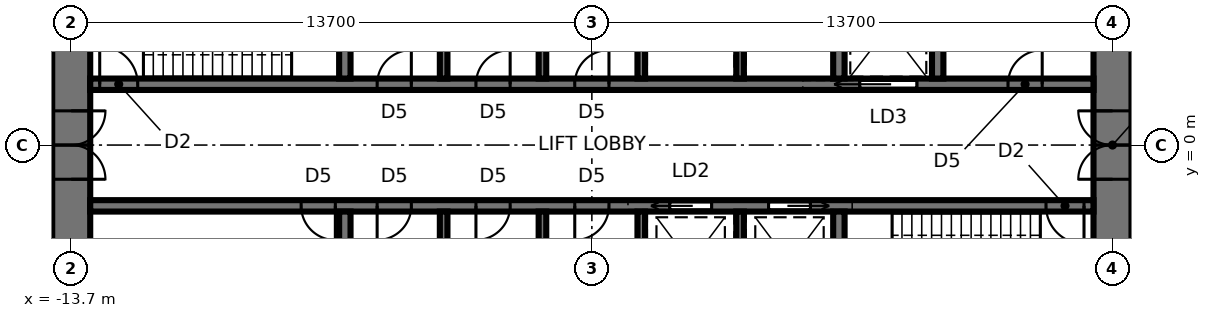
"""IFC4 building model, lengths in metres.
Left out: names, types, materials, properties, quantities, classifications, styles, units other than length and angle.
Written with IfcOpenShell. Run it as: python <this file> out.ifc"""

import sys

from ifc_helpers import new_model, si_unit, direction, frame, frame_2d, origin, place, context, subcontext, project, spatial, rectangle, extrude, element, fill, save


model = new_model("IFC4")
c1 = context("Model", 3, precision=1e-05, world=origin(), true_north=direction((0.0, 1.0)))
c2 = subcontext(c1, "Body", "Model", "MODEL_VIEW")
j1 = project(units=[si_unit("LENGTHUNIT", "METRE"), si_unit("PLANEANGLEUNIT", "RADIAN")], contexts=[c1])
p1 = place(None, origin())
s1 = spatial("IfcSite", under=j1, at=p1, CompositionType="ELEMENT")
p2 = place(p1, origin())
s2 = spatial("IfcBuilding", under=s1, at=p2, CompositionType="ELEMENT")
p3 = place(p2, frame((0.0, 0.0, 246.2)))
s3 = spatial("IfcBuildingStorey", under=s2, at=p3, CompositionType="ELEMENT", Elevation=246.2)
p4 = place(p3, frame((13.7, -9.5, 0.0), z_axis=(0.0, 0.0, 1.0), x_axis=(0.0, 1.0, 0.0)))
e1 = element("IfcWall", 1, at=p4, inside=s3, PredefinedType="SHEAR", context=c2, shape_type="SweptSolid", body=[
    extrude(rectangle(XDim=19.0, YDim=1.0, at=frame_2d((9.5, 0.0))), origin(), (0.0, 0.0, 1.0), 5.6),
])
p5 = place(p4, frame((8.6, 0.0, 0.0)))
e2 = element("IfcOpeningElement", 2, at=p5, cuts=e1, PredefinedType="OPENING", context=c2, shape_type="SweptSolid", body=[
    extrude(rectangle(XDim=1.8, YDim=2.4, at=frame_2d((0.9, 1.2))), frame((0.0, 0.51, 0.0), z_axis=(0.0, -1.0, 0.0), x_axis=(1.0, 0.0, 0.0)), (0.0, 0.0, 1.0), 1.02),
])
p6 = place(p3, frame((-13.7, 9.5, 0.0), z_axis=(0.0, 0.0, 1.0), x_axis=(0.0, -1.0, 0.0)))
e3 = element("IfcWall", 3, at=p6, inside=s3, PredefinedType="SHEAR", context=c2, shape_type="SweptSolid", body=[
    extrude(rectangle(XDim=19.0, YDim=1.0, at=frame_2d((9.5, 0.0))), origin(), (0.0, 0.0, 1.0), 5.6),
])
p7 = place(p6, frame((8.6, 0.0, 0.0)))
e4 = element("IfcOpeningElement", 4, at=p7, cuts=e3, PredefinedType="OPENING", context=c2, shape_type="SweptSolid", body=[
    extrude(rectangle(XDim=1.8, YDim=2.4, at=frame_2d((0.9, 1.2))), frame((0.0, 0.51, 0.0), z_axis=(0.0, -1.0, 0.0), x_axis=(1.0, 0.0, 0.0)), (0.0, 0.0, 1.0), 1.02),
])
p8 = place(p3, frame((-13.2, 1.6, 0.0), z_axis=(0.0, 0.0, 1.0), x_axis=(1.0, 0.0, 0.0)))
e5 = element("IfcWall", 5, at=p8, inside=s3, PredefinedType="SHEAR", context=c2, shape_type="SweptSolid", body=[
    extrude(rectangle(XDim=26.4, YDim=0.3, at=frame_2d((13.2, 0.0))), origin(), (0.0, 0.0, 1.0), 5.6),
])
p9 = place(p8, frame((0.25, 0.0, 0.0)))
e6 = element("IfcOpeningElement", 6, at=p9, cuts=e5, PredefinedType="OPENING", context=c2, shape_type="SweptSolid", body=[
    extrude(rectangle(XDim=1.0, YDim=2.1, at=frame_2d((0.5, 1.05))), frame((0.0, 0.16, 0.0), z_axis=(0.0, -1.0, 0.0), x_axis=(1.0, 0.0, 0.0)), (0.0, 0.0, 1.0), 0.32),
])
p10 = place(p8, frame((20.25, 0.0, 0.0)))
e7 = element("IfcOpeningElement", 7, at=p10, cuts=e5, PredefinedType="OPENING", context=c2, shape_type="SweptSolid", body=[
    extrude(rectangle(XDim=1.5, YDim=2.4, at=frame_2d((0.75, 1.2))), frame((0.0, 0.16, 0.0), z_axis=(0.0, -1.0, 0.0), x_axis=(1.0, 0.0, 0.0)), (0.0, 0.0, 1.0), 0.32),
])
p11 = place(p8, frame((7.55, 0.0, 0.0)))
e8 = element("IfcOpeningElement", 8, at=p11, cuts=e5, PredefinedType="OPENING", context=c2, shape_type="SweptSolid", body=[
    extrude(rectangle(XDim=0.9, YDim=2.1, at=frame_2d((0.45, 1.05))), frame((0.0, 0.16, 0.0), z_axis=(0.0, -1.0, 0.0), x_axis=(1.0, 0.0, 0.0)), (0.0, 0.0, 1.0), 0.32),
])
p12 = place(p8, frame((10.15, 0.0, 0.0)))
e9 = element("IfcOpeningElement", 9, at=p12, cuts=e5, PredefinedType="OPENING", context=c2, shape_type="SweptSolid", body=[
    extrude(rectangle(XDim=0.9, YDim=2.1, at=frame_2d((0.45, 1.05))), frame((0.0, 0.16, 0.0), z_axis=(0.0, -1.0, 0.0), x_axis=(1.0, 0.0, 0.0)), (0.0, 0.0, 1.0), 0.32),
])
p13 = place(p8, frame((12.75, 0.0, 0.0)))
e10 = element("IfcOpeningElement", 10, at=p13, cuts=e5, PredefinedType="OPENING", context=c2, shape_type="SweptSolid", body=[
    extrude(rectangle(XDim=0.9, YDim=2.1, at=frame_2d((0.45, 1.05))), frame((0.0, 0.16, 0.0), z_axis=(0.0, -1.0, 0.0), x_axis=(1.0, 0.0, 0.0)), (0.0, 0.0, 1.0), 0.32),
])
p14 = place(p8, frame((24.15, 0.0, 0.0)))
e11 = element("IfcOpeningElement", 11, at=p14, cuts=e5, PredefinedType="OPENING", context=c2, shape_type="SweptSolid", body=[
    extrude(rectangle(XDim=0.9, YDim=2.1, at=frame_2d((0.45, 1.05))), frame((0.0, 0.16, 0.0), z_axis=(0.0, -1.0, 0.0), x_axis=(1.0, 0.0, 0.0)), (0.0, 0.0, 1.0), 0.32),
])
p15 = place(p3, frame((-13.2, -1.6, 0.0), z_axis=(0.0, 0.0, 1.0), x_axis=(1.0, 0.0, 0.0)))
e12 = element("IfcWall", 12, at=p15, inside=s3, PredefinedType="SHEAR", context=c2, shape_type="SweptSolid", body=[
    extrude(rectangle(XDim=26.4, YDim=0.3, at=frame_2d((13.2, 0.0))), origin(), (0.0, 0.0, 1.0), 5.6),
])
p16 = place(p15, frame((25.15, 0.0, 0.0)))
e13 = element("IfcOpeningElement", 13, at=p16, cuts=e12, PredefinedType="OPENING", context=c2, shape_type="SweptSolid", body=[
    extrude(rectangle(XDim=1.0, YDim=2.1, at=frame_2d((0.5, 1.05))), frame((0.0, 0.16, 0.0), z_axis=(0.0, -1.0, 0.0), x_axis=(1.0, 0.0, 0.0)), (0.0, 0.0, 1.0), 0.32),
])
p17 = place(p15, frame((7.55, 0.0, 0.0)))
e14 = element("IfcOpeningElement", 14, at=p17, cuts=e12, PredefinedType="OPENING", context=c2, shape_type="SweptSolid", body=[
    extrude(rectangle(XDim=0.9, YDim=2.1, at=frame_2d((0.45, 1.05))), frame((0.0, 0.16, 0.0), z_axis=(0.0, -1.0, 0.0), x_axis=(1.0, 0.0, 0.0)), (0.0, 0.0, 1.0), 0.32),
])
p18 = place(p15, frame((10.15, 0.0, 0.0)))
e15 = element("IfcOpeningElement", 15, at=p18, cuts=e12, PredefinedType="OPENING", context=c2, shape_type="SweptSolid", body=[
    extrude(rectangle(XDim=0.9, YDim=2.1, at=frame_2d((0.45, 1.05))), frame((0.0, 0.16, 0.0), z_axis=(0.0, -1.0, 0.0), x_axis=(1.0, 0.0, 0.0)), (0.0, 0.0, 1.0), 0.32),
])
p19 = place(p15, frame((12.75, 0.0, 0.0)))
e16 = element("IfcOpeningElement", 16, at=p19, cuts=e12, PredefinedType="OPENING", context=c2, shape_type="SweptSolid", body=[
    extrude(rectangle(XDim=0.9, YDim=2.1, at=frame_2d((0.45, 1.05))), frame((0.0, 0.16, 0.0), z_axis=(0.0, -1.0, 0.0), x_axis=(1.0, 0.0, 0.0)), (0.0, 0.0, 1.0), 0.32),
])
p20 = place(p15, frame((15.25, 0.0, 0.0)))
e17 = element("IfcOpeningElement", 17, at=p20, cuts=e12, PredefinedType="OPENING", context=c2, shape_type="SweptSolid", body=[
    extrude(rectangle(XDim=1.1, YDim=2.3, at=frame_2d((0.55, 1.15))), frame((0.0, 0.16, 0.0), z_axis=(0.0, -1.0, 0.0), x_axis=(1.0, 0.0, 0.0)), (0.0, 0.0, 1.0), 0.32),
])
p21 = place(p15, frame((17.85, 0.0, 0.0)))
e18 = element("IfcOpeningElement", 18, at=p21, cuts=e12, PredefinedType="OPENING", context=c2, shape_type="SweptSolid", body=[
    extrude(rectangle(XDim=1.1, YDim=2.3, at=frame_2d((0.55, 1.15))), frame((0.0, 0.16, 0.0), z_axis=(0.0, -1.0, 0.0), x_axis=(1.0, 0.0, 0.0)), (0.0, 0.0, 1.0), 0.32),
])
p22 = place(p15, frame((5.55, 0.0, 0.0)))
e19 = element("IfcOpeningElement", 19, at=p22, cuts=e12, PredefinedType="OPENING", context=c2, shape_type="SweptSolid", body=[
    extrude(rectangle(XDim=0.9, YDim=2.1, at=frame_2d((0.45, 1.05))), frame((0.0, 0.16, 0.0), z_axis=(0.0, -1.0, 0.0), x_axis=(1.0, 0.0, 0.0)), (0.0, 0.0, 1.0), 0.32),
])
for number, where, z_axis, x_axis in (
    (20, (-6.5, 1.75, 0.0), (0.0, 0.0, 1.0), (0.0, 1.0, 0.0)),
    (21, (6.5, 1.75, 0.0), (0.0, 0.0, 1.0), (0.0, 1.0, 0.0)),
):
    element("IfcWall", number, at=place(p3, frame(where, z_axis=z_axis, x_axis=x_axis)), inside=s3, PredefinedType="SHEAR", context=c2, shape_type="SweptSolid", body=[
        extrude(rectangle(XDim=2.7, YDim=0.3, at=frame_2d((1.35, 0.0))), origin(), (0.0, 0.0, 1.0), 5.6),
    ])
for number, where, z_axis, x_axis in (
    (22, (-3.9, 1.75, 0.0), (0.0, 0.0, 1.0), (0.0, 1.0, 0.0)),
    (23, (-1.3, 1.75, 0.0), (0.0, 0.0, 1.0), (0.0, 1.0, 0.0)),
    (24, (1.3, 1.75, 0.0), (0.0, 0.0, 1.0), (0.0, 1.0, 0.0)),
    (25, (3.9, 1.75, 0.0), (0.0, 0.0, 1.0), (0.0, 1.0, 0.0)),
):
    element("IfcWall", number, at=place(p3, frame(where, z_axis=z_axis, x_axis=x_axis)), inside=s3, PredefinedType="SHEAR", context=c2, shape_type="SweptSolid", body=[
        extrude(rectangle(XDim=2.7, YDim=0.2, at=frame_2d((1.35, 0.0))), origin(), (0.0, 0.0, 1.0), 5.6),
    ])
for number, where, z_axis, x_axis in (
    (26, (-6.5, -1.75, 0.0), (0.0, 0.0, 1.0), (0.0, -1.0, 0.0)),
    (27, (6.5, -1.75, 0.0), (0.0, 0.0, 1.0), (0.0, -1.0, 0.0)),
):
    element("IfcWall", number, at=place(p3, frame(where, z_axis=z_axis, x_axis=x_axis)), inside=s3, PredefinedType="SHEAR", context=c2, shape_type="SweptSolid", body=[
        extrude(rectangle(XDim=2.7, YDim=0.3, at=frame_2d((1.35, 0.0))), origin(), (0.0, 0.0, 1.0), 5.6),
    ])
for number, where, z_axis, x_axis in (
    (28, (-3.9, -1.75, 0.0), (0.0, 0.0, 1.0), (0.0, -1.0, 0.0)),
    (29, (-1.3, -1.75, 0.0), (0.0, 0.0, 1.0), (0.0, -1.0, 0.0)),
    (30, (1.3, -1.75, 0.0), (0.0, 0.0, 1.0), (0.0, -1.0, 0.0)),
    (31, (3.9, -1.75, 0.0), (0.0, 0.0, 1.0), (0.0, -1.0, 0.0)),
):
    element("IfcWall", number, at=place(p3, frame(where, z_axis=z_axis, x_axis=x_axis)), inside=s3, PredefinedType="SHEAR", context=c2, shape_type="SweptSolid", body=[
        extrude(rectangle(XDim=2.7, YDim=0.2, at=frame_2d((1.35, 0.0))), origin(), (0.0, 0.0, 1.0), 5.6),
    ])
p23 = place(p3, frame((9.1, 1.75, 0.0), z_axis=(0.0, 0.0, 1.0), x_axis=(0.0, 1.0, 0.0)))
e32 = element("IfcWall", 32, at=p23, inside=s3, PredefinedType="SHEAR", context=c2, shape_type="SweptSolid", body=[
    extrude(rectangle(XDim=2.7, YDim=0.3, at=frame_2d((1.35, 0.0))), origin(), (0.0, 0.0, 1.0), 5.6),
])
p24 = place(p7, origin())
e33 = element("IfcDoor", 33, at=p24, inside=s3, OperationType="DOUBLE_DOOR_SINGLE_SWING", PredefinedType="DOOR", context=c2, shape_type="SweptSolid", body=[
    extrude(rectangle(XDim=1.72, YDim=2.36, at=frame_2d((0.9, 1.18))), frame((0.0, 0.025, 0.0), z_axis=(0.0, -1.0, 0.0), x_axis=(1.0, 0.0, 0.0)), (0.0, 0.0, 1.0), 0.05),
    extrude(rectangle(XDim=0.04, YDim=2.4, at=frame_2d((0.02, 1.2))), frame((0.0, 0.25, 0.0), z_axis=(0.0, -1.0, 0.0), x_axis=(1.0, 0.0, 0.0)), (0.0, 0.0, 1.0), 0.5),
    extrude(rectangle(XDim=0.04, YDim=2.4, at=frame_2d((1.78, 1.2))), frame((0.0, 0.25, 0.0), z_axis=(0.0, -1.0, 0.0), x_axis=(1.0, 0.0, 0.0)), (0.0, 0.0, 1.0), 0.5),
    extrude(rectangle(XDim=1.72, YDim=0.04, at=frame_2d((0.9, 2.38))), frame((0.0, 0.25, 0.0), z_axis=(0.0, -1.0, 0.0), x_axis=(1.0, 0.0, 0.0)), (0.0, 0.0, 1.0), 0.5),
])
fill(e4, e33)
p25 = place(p5, origin())
e34 = element("IfcDoor", 34, at=p25, inside=s3, OperationType="DOUBLE_DOOR_SINGLE_SWING", PredefinedType="DOOR", context=c2, shape_type="SweptSolid", body=[
    extrude(rectangle(XDim=1.72, YDim=2.36, at=frame_2d((0.9, 1.18))), frame((0.0, 0.025, 0.0), z_axis=(0.0, -1.0, 0.0), x_axis=(1.0, 0.0, 0.0)), (0.0, 0.0, 1.0), 0.05),
    extrude(rectangle(XDim=0.04, YDim=2.4, at=frame_2d((0.02, 1.2))), frame((0.0, 0.25, 0.0), z_axis=(0.0, -1.0, 0.0), x_axis=(1.0, 0.0, 0.0)), (0.0, 0.0, 1.0), 0.5),
    extrude(rectangle(XDim=0.04, YDim=2.4, at=frame_2d((1.78, 1.2))), frame((0.0, 0.25, 0.0), z_axis=(0.0, -1.0, 0.0), x_axis=(1.0, 0.0, 0.0)), (0.0, 0.0, 1.0), 0.5),
    extrude(rectangle(XDim=1.72, YDim=0.04, at=frame_2d((0.9, 2.38))), frame((0.0, 0.25, 0.0), z_axis=(0.0, -1.0, 0.0), x_axis=(1.0, 0.0, 0.0)), (0.0, 0.0, 1.0), 0.5),
])
fill(e2, e34)
p26 = place(p9, origin())
e35 = element("IfcDoor", 35, at=p26, inside=s3, OperationType="SINGLE_SWING_LEFT", PredefinedType="DOOR", context=c2, shape_type="SweptSolid", body=[
    extrude(rectangle(XDim=1.0, YDim=2.1, at=frame_2d((0.5, 1.05))), frame((0.0, 0.025, 0.0), z_axis=(0.0, -1.0, 0.0), x_axis=(1.0, 0.0, 0.0)), (0.0, 0.0, 1.0), 0.05),
])
fill(e6, e35)
p27 = place(p16, frame((1.0, 0.0, 0.0), z_axis=(0.0, 0.0, 1.0), x_axis=(-1.0, 0.0, 0.0)))
e36 = element("IfcDoor", 36, at=p27, inside=s3, OperationType="SINGLE_SWING_LEFT", PredefinedType="DOOR", context=c2, shape_type="SweptSolid", body=[
    extrude(rectangle(XDim=1.0, YDim=2.1, at=frame_2d((0.5, 1.05))), frame((0.0, 0.025, 0.0), z_axis=(0.0, -1.0, 0.0), x_axis=(1.0, 0.0, 0.0)), (0.0, 0.0, 1.0), 0.05),
])
fill(e13, e36)
p28 = place(p10, origin())
e37 = element("IfcDoor", 37, at=p28, inside=s3, OperationType="SLIDING_TO_LEFT", PredefinedType="DOOR", context=c2, shape_type="SweptSolid", body=[
    extrude(rectangle(XDim=1.5, YDim=2.4, at=frame_2d((0.75, 1.2))), frame((0.0, 0.025, 0.0), z_axis=(0.0, -1.0, 0.0), x_axis=(1.0, 0.0, 0.0)), (0.0, 0.0, 1.0), 0.05),
])
fill(e7, e37)
p29 = place(p11, origin())
e38 = element("IfcDoor", 38, at=p29, inside=s3, OperationType="SINGLE_SWING_RIGHT", PredefinedType="DOOR", context=c2, shape_type="SweptSolid", body=[
    extrude(rectangle(XDim=0.9, YDim=2.1, at=frame_2d((0.45, 1.05))), frame((0.0, 0.025, 0.0), z_axis=(0.0, -1.0, 0.0), x_axis=(1.0, 0.0, 0.0)), (0.0, 0.0, 1.0), 0.05),
])
fill(e8, e38)
p30 = place(p12, origin())
e39 = element("IfcDoor", 39, at=p30, inside=s3, OperationType="SINGLE_SWING_RIGHT", PredefinedType="DOOR", context=c2, shape_type="SweptSolid", body=[
    extrude(rectangle(XDim=0.9, YDim=2.1, at=frame_2d((0.45, 1.05))), frame((0.0, 0.025, 0.0), z_axis=(0.0, -1.0, 0.0), x_axis=(1.0, 0.0, 0.0)), (0.0, 0.0, 1.0), 0.05),
])
fill(e9, e39)
p31 = place(p13, origin())
e40 = element("IfcDoor", 40, at=p31, inside=s3, OperationType="SINGLE_SWING_RIGHT", PredefinedType="DOOR", context=c2, shape_type="SweptSolid", body=[
    extrude(rectangle(XDim=0.9, YDim=2.1, at=frame_2d((0.45, 1.05))), frame((0.0, 0.025, 0.0), z_axis=(0.0, -1.0, 0.0), x_axis=(1.0, 0.0, 0.0)), (0.0, 0.0, 1.0), 0.05),
])
fill(e10, e40)
p32 = place(p17, frame((0.9, 0.0, 0.0), z_axis=(0.0, 0.0, 1.0), x_axis=(-1.0, 0.0, 0.0)))
e41 = element("IfcDoor", 41, at=p32, inside=s3, OperationType="SINGLE_SWING_RIGHT", PredefinedType="DOOR", context=c2, shape_type="SweptSolid", body=[
    extrude(rectangle(XDim=0.9, YDim=2.1, at=frame_2d((0.45, 1.05))), frame((0.0, 0.025, 0.0), z_axis=(0.0, -1.0, 0.0), x_axis=(1.0, 0.0, 0.0)), (0.0, 0.0, 1.0), 0.05),
])
fill(e14, e41)
p33 = place(p18, frame((0.9, 0.0, 0.0), z_axis=(0.0, 0.0, 1.0), x_axis=(-1.0, 0.0, 0.0)))
e42 = element("IfcDoor", 42, at=p33, inside=s3, OperationType="SINGLE_SWING_RIGHT", PredefinedType="DOOR", context=c2, shape_type="SweptSolid", body=[
    extrude(rectangle(XDim=0.9, YDim=2.1, at=frame_2d((0.45, 1.05))), frame((0.0, 0.025, 0.0), z_axis=(0.0, -1.0, 0.0), x_axis=(1.0, 0.0, 0.0)), (0.0, 0.0, 1.0), 0.05),
])
fill(e15, e42)
p34 = place(p19, frame((0.9, 0.0, 0.0), z_axis=(0.0, 0.0, 1.0), x_axis=(-1.0, 0.0, 0.0)))
e43 = element("IfcDoor", 43, at=p34, inside=s3, OperationType="SINGLE_SWING_RIGHT", PredefinedType="DOOR", context=c2, shape_type="SweptSolid", body=[
    extrude(rectangle(XDim=0.9, YDim=2.1, at=frame_2d((0.45, 1.05))), frame((0.0, 0.025, 0.0), z_axis=(0.0, -1.0, 0.0), x_axis=(1.0, 0.0, 0.0)), (0.0, 0.0, 1.0), 0.05),
])
fill(e16, e43)
p35 = place(p20, frame((1.1, 0.0, 0.0), z_axis=(0.0, 0.0, 1.0), x_axis=(-1.0, 0.0, 0.0)))
e44 = element("IfcDoor", 44, at=p35, inside=s3, OperationType="SLIDING_TO_RIGHT", PredefinedType="DOOR", context=c2, shape_type="SweptSolid", body=[
    extrude(rectangle(XDim=1.1, YDim=2.3, at=frame_2d((0.55, 1.15))), frame((0.0, 0.025, 0.0), z_axis=(0.0, -1.0, 0.0), x_axis=(1.0, 0.0, 0.0)), (0.0, 0.0, 1.0), 0.05),
])
fill(e17, e44)
p36 = place(p21, frame((1.1, 0.0, 0.0), z_axis=(0.0, 0.0, 1.0), x_axis=(-1.0, 0.0, 0.0)))
e45 = element("IfcDoor", 45, at=p36, inside=s3, OperationType="SLIDING_TO_LEFT", PredefinedType="DOOR", context=c2, shape_type="SweptSolid", body=[
    extrude(rectangle(XDim=1.1, YDim=2.3, at=frame_2d((0.55, 1.15))), frame((0.0, 0.025, 0.0), z_axis=(0.0, -1.0, 0.0), x_axis=(1.0, 0.0, 0.0)), (0.0, 0.0, 1.0), 0.05),
])
fill(e18, e45)
p37 = place(p14, origin())
e46 = element("IfcDoor", 46, at=p37, inside=s3, OperationType="SINGLE_SWING_RIGHT", PredefinedType="DOOR", context=c2, shape_type="SweptSolid", body=[
    extrude(rectangle(XDim=0.9, YDim=2.1, at=frame_2d((0.45, 1.05))), frame((0.0, 0.025, 0.0), z_axis=(0.0, -1.0, 0.0), x_axis=(1.0, 0.0, 0.0)), (0.0, 0.0, 1.0), 0.05),
])
fill(e11, e46)
p38 = place(p22, frame((0.9, 0.0, 0.0), z_axis=(0.0, 0.0, 1.0), x_axis=(-1.0, 0.0, 0.0)))
e47 = element("IfcDoor", 47, at=p38, inside=s3, OperationType="SINGLE_SWING_LEFT", PredefinedType="DOOR", context=c2, shape_type="SweptSolid", body=[
    extrude(rectangle(XDim=0.9, YDim=2.1, at=frame_2d((0.45, 1.05))), frame((0.0, 0.025, 0.0), z_axis=(0.0, -1.0, 0.0), x_axis=(1.0, 0.0, 0.0)), (0.0, 0.0, 1.0), 0.05),
])
fill(e19, e47)
save(model, sys.argv[1])
